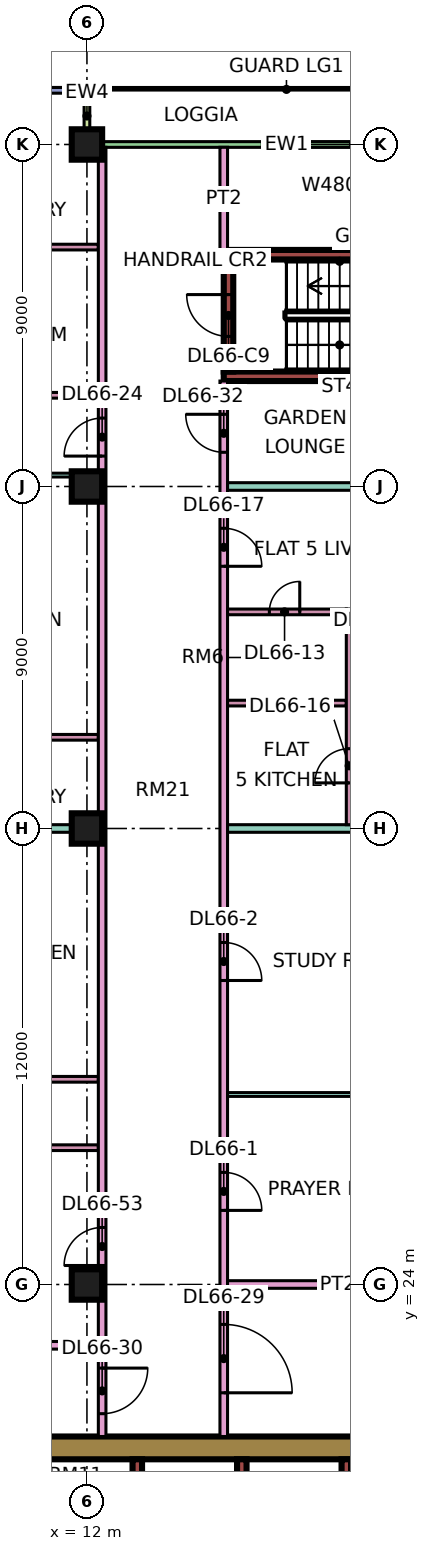
"""IFC4 building model, lengths in metres.
Left out: names, types, materials, properties, quantities, classifications, styles, units other than length and angle.
Written with IfcOpenShell. Run it as: python <this file> out.ifc"""

import sys

from ifc_helpers import new_model, si_unit, direction, frame, frame_2d, origin, origin_2d, place, context, subcontext, project, spatial, rectangle, extrude, element, fill, save


model = new_model("IFC4")
c1 = context("Model", 3, precision=1e-05, world=origin(), true_north=direction((0.0, 1.0)))
c2 = subcontext(c1, "Body", "Model", "MODEL_VIEW")
j1 = project(units=[si_unit("LENGTHUNIT", "METRE"), si_unit("PLANEANGLEUNIT", "RADIAN")], contexts=[c1])
p1 = place(None, origin())
s1 = spatial("IfcSite", under=j1, at=p1, CompositionType="ELEMENT")
p2 = place(p1, origin())
s2 = spatial("IfcBuilding", under=s1, at=p2, CompositionType="ELEMENT")
p3 = place(p2, frame((0.0, 0.0, 284.65)))
s3 = spatial("IfcBuildingStorey", under=s2, at=p3, CompositionType="ELEMENT", Elevation=284.65)
for number, where, z_axis, x_axis in (
    (1, (12.0, 24.0, 0.0), (0.0, 0.0, 1.0), (1.0, 0.0, 0.0)),
    (2, (12.0, 36.0, 0.0), (0.0, 0.0, 1.0), (1.0, 0.0, 0.0)),
    (3, (12.0, 45.0, 0.0), (0.0, 0.0, 1.0), (1.0, 0.0, 0.0)),
    (4, (12.0, 54.0, 0.0), (0.0, 0.0, 1.0), (1.0, 0.0, 0.0)),
):
    element("IfcColumn", number, at=place(p3, frame(where, z_axis=z_axis, x_axis=x_axis)), inside=s3, PredefinedType="COLUMN", context=c2, shape_type="SweptSolid", body=[
        extrude(rectangle(XDim=0.8, YDim=0.8, at=origin_2d()), origin(), (0.0, 0.0, 1.0), 3.75),
    ])
p4 = place(p3, frame((9.0, 19.7, 0.0), z_axis=(0.0, 0.0, 1.0), x_axis=(1.0, 0.0, 0.0)))
e5 = element("IfcWall", 5, at=p4, inside=s3, PredefinedType="SHEAR", context=c2, shape_type="SweptSolid", body=[
    extrude(rectangle(XDim=25.0, YDim=0.6, at=frame_2d((12.5, 0.0))), origin(), (0.0, 0.0, 1.0), 3.75),
])
p5 = place(p4, frame((19.1, 0.0, 0.0)))
e6 = element("IfcOpeningElement", 6, at=p5, cuts=e5, PredefinedType="OPENING", context=c2, shape_type="SweptSolid", body=[
    extrude(rectangle(XDim=1.8, YDim=2.4, at=frame_2d((0.9, 1.2))), frame((0.0, 0.31, 0.0), z_axis=(0.0, -1.0, 0.0), x_axis=(1.0, 0.0, 0.0)), (0.0, 0.0, 1.0), 0.62),
])
p6 = place(p3, frame((13.325, 7.6, 0.0), z_axis=(0.0, 0.0, 1.0), x_axis=(0.0, 1.0, 0.0)))
e7 = element("IfcWall", 7, at=p6, inside=s3, PredefinedType="SHEAR", context=c2, shape_type="SweptSolid", body=[
    extrude(rectangle(XDim=11.8, YDim=0.25, at=frame_2d((5.9, 0.0))), origin(), (0.0, 0.0, 1.0), 3.75),
])
for number, where, z_axis, x_axis in (
    (8, (16.075, 15.8, 0.0), (0.0, 0.0, 1.0), (0.0, 1.0, 0.0)),
    (9, (18.825, 15.8, 0.0), (0.0, 0.0, 1.0), (0.0, 1.0, 0.0)),
):
    element("IfcWall", number, at=place(p3, frame(where, z_axis=z_axis, x_axis=x_axis)), inside=s3, PredefinedType="SHEAR", context=c2, shape_type="SweptSolid", body=[
        extrude(rectangle(XDim=3.6, YDim=0.25, at=frame_2d((1.8, 0.0))), origin(), (0.0, 0.0, 1.0), 3.75),
    ])
for number, where, z_axis, x_axis in (
    (10, (15.6, 47.9, 0.0), (0.0, 0.0, 1.0), (1.0, 0.0, 0.0)),
    (11, (15.6, 51.1, 0.0), (0.0, 0.0, 1.0), (1.0, 0.0, 0.0)),
):
    element("IfcWall", number, at=place(p3, frame(where, z_axis=z_axis, x_axis=x_axis)), inside=s3, PredefinedType="SHEAR", context=c2, shape_type="SweptSolid", body=[
        extrude(rectangle(XDim=7.0, YDim=0.25, at=frame_2d((3.5, 0.0))), origin(), (0.0, 0.0, 1.0), 3.75),
    ])
p7 = place(p3, frame((15.725, 48.025, 0.0), z_axis=(0.0, 0.0, 1.0), x_axis=(0.0, 1.0, 0.0)))
e12 = element("IfcWall", 12, at=p7, inside=s3, PredefinedType="SHEAR", context=c2, shape_type="SweptSolid", body=[
    extrude(rectangle(XDim=2.95, YDim=0.25, at=frame_2d((1.475, 0.0))), origin(), (0.0, 0.0, 1.0), 3.75),
])
p8 = place(p7, frame((0.925, 0.0, 0.0)))
e13 = element("IfcOpeningElement", 13, at=p8, cuts=e12, PredefinedType="OPENING", context=c2, shape_type="SweptSolid", body=[
    extrude(rectangle(XDim=1.1, YDim=2.2, at=frame_2d((0.55, 1.1))), frame((0.0, 0.135, 0.0), z_axis=(0.0, -1.0, 0.0), x_axis=(1.0, 0.0, 0.0)), (0.0, 0.0, 1.0), 0.27),
])
p9 = place(p3, frame((22.425, 54.0, 0.0), z_axis=(0.0, 0.0, 1.0), x_axis=(-1.0, 0.0, 0.0)))
e14 = element("IfcWall", 14, at=p9, inside=s3, PredefinedType="SOLIDWALL", context=c2, shape_type="SweptSolid", body=[
    extrude(rectangle(XDim=10.35, YDim=0.15, at=frame_2d((5.175, 0.0))), origin(), (0.0, 0.0, 1.0), 3.35),
])
p10 = place(p9, frame((1.012, 0.0, 0.45)))
e15 = element("IfcOpeningElement", 15, at=p10, cuts=e14, PredefinedType="OPENING", context=c2, shape_type="SweptSolid", body=[
    extrude(rectangle(XDim=4.8, YDim=2.4, at=frame_2d((2.4, 1.2))), frame((0.0, 0.085, 0.0), z_axis=(0.0, -1.0, 0.0), x_axis=(1.0, 0.0, 0.0)), (0.0, 0.0, 1.0), 0.17),
])
p11 = place(p3, frame((12.0, 55.5, 0.0), z_axis=(0.0, 0.0, 1.0), x_axis=(0.0, -1.0, 0.0)))
e16 = element("IfcWall", 16, at=p11, inside=s3, PredefinedType="SOLIDWALL", context=c2, shape_type="SweptSolid", body=[
    extrude(rectangle(XDim=1.5, YDim=0.15, at=frame_2d((0.75, 0.0))), origin(), (0.0, 0.0, 1.0), 3.35),
])
p12 = place(p3, frame((11.925, 55.425, 0.0), z_axis=(0.0, 0.0, 1.0), x_axis=(-1.0, 0.0, 0.0)))
e17 = element("IfcWall", 17, at=p12, inside=s3, PredefinedType="SOLIDWALL", context=c2, shape_type="SweptSolid", body=[
    extrude(rectangle(XDim=10.425, YDim=0.15, at=frame_2d((5.212, 0.0))), origin(), (0.0, 0.0, 1.0), 3.35),
])
p13 = place(p12, frame((1.562, 0.0, 1.7)))
e18 = element("IfcOpeningElement", 18, at=p13, cuts=e17, PredefinedType="OPENING", context=c2, shape_type="SweptSolid", body=[
    extrude(rectangle(XDim=1.2, YDim=0.9, at=frame_2d((0.6, 0.45))), frame((0.0, 0.085, 0.0), z_axis=(0.0, -1.0, 0.0), x_axis=(1.0, 0.0, 0.0)), (0.0, 0.0, 1.0), 0.17),
])
p14 = place(p12, frame((6.475, 0.0, 0.45)))
e19 = element("IfcOpeningElement", 19, at=p14, cuts=e17, PredefinedType="OPENING", context=c2, shape_type="SweptSolid", body=[
    extrude(rectangle(XDim=3.0, YDim=2.4, at=frame_2d((1.5, 1.2))), frame((0.0, 0.085, 0.0), z_axis=(0.0, -1.0, 0.0), x_axis=(1.0, 0.0, 0.0)), (0.0, 0.0, 1.0), 0.17),
])
p15 = place(p3, frame((0.0, 36.0, 0.0), z_axis=(0.0, 0.0, 1.0), x_axis=(1.0, 0.0, 0.0)))
e20 = element("IfcWall", 20, at=p15, inside=s3, PredefinedType="PARTITIONING", context=c2, shape_type="SweptSolid", body=[
    extrude(rectangle(XDim=12.3, YDim=0.2, at=frame_2d((6.15, 0.0))), origin(), (0.0, 0.0, 1.0), 3.35),
])
p16 = place(p3, frame((0.074, 22.4, 0.0), z_axis=(0.0, 0.0, 1.0), x_axis=(1.0, 0.0, 0.0)))
e21 = element("IfcWall", 21, at=p16, inside=s3, PredefinedType="PARTITIONING", context=c2, shape_type="SweptSolid", body=[
    extrude(rectangle(XDim=12.226, YDim=0.2, at=frame_2d((6.113, 0.0))), origin(), (0.0, 0.0, 1.0), 3.35),
])
for number, where, z_axis, x_axis in (
    (22, (7.075, 27.6, 0.0), (0.0, 0.0, 1.0), (1.0, 0.0, 0.0)),
    (23, (7.075, 29.4, 0.0), (0.0, 0.0, 1.0), (1.0, 0.0, 0.0)),
):
    element("IfcWall", number, at=place(p3, frame(where, z_axis=z_axis, x_axis=x_axis)), inside=s3, PredefinedType="PARTITIONING", context=c2, shape_type="SweptSolid", body=[
        extrude(rectangle(XDim=5.225, YDim=0.15, at=frame_2d((2.613, 0.0))), origin(), (0.0, 0.0, 1.0), 3.35),
    ])
p17 = place(p3, frame((7.675, 38.4, 0.0), z_axis=(0.0, 0.0, 1.0), x_axis=(1.0, 0.0, 0.0)))
e24 = element("IfcWall", 24, at=p17, inside=s3, PredefinedType="PARTITIONING", context=c2, shape_type="SweptSolid", body=[
    extrude(rectangle(XDim=4.625, YDim=0.15, at=frame_2d((2.312, 0.0))), origin(), (0.0, 0.0, 1.0), 3.35),
])
p18 = place(p3, frame((7.675, 45.3, 0.0), z_axis=(0.0, 0.0, 1.0), x_axis=(1.0, 0.0, 0.0)))
e25 = element("IfcWall", 25, at=p18, inside=s3, PredefinedType="PARTITIONING", context=c2, shape_type="SweptSolid", body=[
    extrude(rectangle(XDim=4.625, YDim=0.1, at=frame_2d((2.312, 0.0))), origin(), (0.0, 0.0, 1.0), 3.35),
])
for number, where, z_axis, x_axis in (
    (26, (7.675, 47.4, 0.0), (0.0, 0.0, 1.0), (1.0, 0.0, 0.0)),
    (27, (7.675, 51.3, 0.0), (0.0, 0.0, 1.0), (1.0, 0.0, 0.0)),
):
    element("IfcWall", number, at=place(p3, frame(where, z_axis=z_axis, x_axis=x_axis)), inside=s3, PredefinedType="PARTITIONING", context=c2, shape_type="SweptSolid", body=[
        extrude(rectangle(XDim=4.625, YDim=0.15, at=frame_2d((2.312, 0.0))), origin(), (0.0, 0.0, 1.0), 3.35),
    ])
p19 = place(p3, frame((12.4, 20.0, 0.0), z_axis=(0.0, 0.0, 1.0), x_axis=(0.0, 1.0, 0.0)))
e28 = element("IfcWall", 28, at=p19, inside=s3, PredefinedType="PARTITIONING", context=c2, shape_type="SweptSolid", body=[
    extrude(rectangle(XDim=33.926, YDim=0.2, at=frame_2d((16.963, 0.0))), origin(), (0.0, 0.0, 1.0), 3.35),
])
p20 = place(p19, frame((25.8, 0.0, 0.0)))
e29 = element("IfcOpeningElement", 29, at=p20, cuts=e28, PredefinedType="OPENING", context=c2, shape_type="SweptSolid", body=[
    extrude(rectangle(XDim=1.0, YDim=2.1, at=frame_2d((0.5, 1.05))), frame((0.0, 0.11, 0.0), z_axis=(0.0, -1.0, 0.0), x_axis=(1.0, 0.0, 0.0)), (0.0, 0.0, 1.0), 0.22),
])
p21 = place(p19, frame((0.6, 0.0, 0.0)))
e30 = element("IfcOpeningElement", 30, at=p21, cuts=e28, PredefinedType="OPENING", context=c2, shape_type="SweptSolid", body=[
    extrude(rectangle(XDim=1.2, YDim=2.1, at=frame_2d((0.6, 1.05))), frame((0.0, 0.11, 0.0), z_axis=(0.0, -1.0, 0.0), x_axis=(1.0, 0.0, 0.0)), (0.0, 0.0, 1.0), 0.22),
])
p22 = place(p19, frame((4.5, 0.0, 0.0)))
e31 = element("IfcOpeningElement", 31, at=p22, cuts=e28, PredefinedType="OPENING", context=c2, shape_type="SweptSolid", body=[
    extrude(rectangle(XDim=1.0, YDim=2.1, at=frame_2d((0.5, 1.05))), frame((0.0, 0.11, 0.0), z_axis=(0.0, -1.0, 0.0), x_axis=(1.0, 0.0, 0.0)), (0.0, 0.0, 1.0), 0.22),
])
p23 = place(p3, frame((15.6, 20.0, 0.0), z_axis=(0.0, 0.0, 1.0), x_axis=(0.0, 1.0, 0.0)))
e32 = element("IfcWall", 32, at=p23, inside=s3, PredefinedType="PARTITIONING", context=c2, shape_type="SweptSolid", body=[
    extrude(rectangle(XDim=27.775, YDim=0.2, at=frame_2d((13.887, 0.0))), origin(), (0.0, 0.0, 1.0), 3.35),
])
p24 = place(p23, frame((5.95, 0.0, 0.0)))
e33 = element("IfcOpeningElement", 33, at=p24, cuts=e32, PredefinedType="OPENING", context=c2, shape_type="SweptSolid", body=[
    extrude(rectangle(XDim=1.0, YDim=2.1, at=frame_2d((0.5, 1.05))), frame((0.0, 0.11, 0.0), z_axis=(0.0, -1.0, 0.0), x_axis=(1.0, 0.0, 0.0)), (0.0, 0.0, 1.0), 0.22),
])
p25 = place(p23, frame((12.0, 0.0, 0.0)))
e34 = element("IfcOpeningElement", 34, at=p25, cuts=e32, PredefinedType="OPENING", context=c2, shape_type="SweptSolid", body=[
    extrude(rectangle(XDim=1.0, YDim=2.1, at=frame_2d((0.5, 1.05))), frame((0.0, 0.11, 0.0), z_axis=(0.0, -1.0, 0.0), x_axis=(1.0, 0.0, 0.0)), (0.0, 0.0, 1.0), 0.22),
])
p26 = place(p23, frame((22.9, 0.0, 0.0)))
e35 = element("IfcOpeningElement", 35, at=p26, cuts=e32, PredefinedType="OPENING", context=c2, shape_type="SweptSolid", body=[
    extrude(rectangle(XDim=1.0, YDim=2.1, at=frame_2d((0.5, 1.05))), frame((0.0, 0.11, 0.0), z_axis=(0.0, -1.0, 0.0), x_axis=(1.0, 0.0, 0.0)), (0.0, 0.0, 1.0), 0.22),
])
p27 = place(p23, frame((1.15, 0.0, 0.0)))
e36 = element("IfcOpeningElement", 36, at=p27, cuts=e32, PredefinedType="OPENING", context=c2, shape_type="SweptSolid", body=[
    extrude(rectangle(XDim=1.8, YDim=2.1, at=frame_2d((0.9, 1.05))), frame((0.0, 0.11, 0.0), z_axis=(0.0, -1.0, 0.0), x_axis=(1.0, 0.0, 0.0)), (0.0, 0.0, 1.0), 0.22),
])
p28 = place(p23, frame((25.9, 0.0, 0.0)))
e37 = element("IfcOpeningElement", 37, at=p28, cuts=e32, PredefinedType="OPENING", context=c2, shape_type="SweptSolid", body=[
    extrude(rectangle(XDim=1.0, YDim=2.1, at=frame_2d((0.5, 1.05))), frame((0.0, 0.11, 0.0), z_axis=(0.0, -1.0, 0.0), x_axis=(1.0, 0.0, 0.0)), (0.0, 0.0, 1.0), 0.22),
])
p29 = place(p3, frame((15.6, 51.225, 0.0), z_axis=(0.0, 0.0, 1.0), x_axis=(0.0, 1.0, 0.0)))
e38 = element("IfcWall", 38, at=p29, inside=s3, PredefinedType="PARTITIONING", context=c2, shape_type="SweptSolid", body=[
    extrude(rectangle(XDim=2.701, YDim=0.2, at=frame_2d((1.351, 0.0))), origin(), (0.0, 0.0, 1.0), 3.35),
])
p30 = place(p3, frame((15.7, 24.0, 0.0), z_axis=(0.0, 0.0, 1.0), x_axis=(1.0, 0.0, 0.0)))
e39 = element("IfcWall", 39, at=p30, inside=s3, PredefinedType="PARTITIONING", context=c2, shape_type="SweptSolid", body=[
    extrude(rectangle(XDim=5.8, YDim=0.2, at=frame_2d((2.9, 0.0))), origin(), (0.0, 0.0, 1.0), 3.35),
])
p31 = place(p3, frame((15.7, 29.0, 0.0), z_axis=(0.0, 0.0, 1.0), x_axis=(1.0, 0.0, 0.0)))
e40 = element("IfcWall", 40, at=p31, inside=s3, PredefinedType="PARTITIONING", context=c2, shape_type="SweptSolid", body=[
    extrude(rectangle(XDim=5.8, YDim=0.1, at=frame_2d((2.9, 0.0))), origin(), (0.0, 0.0, 1.0), 3.35),
])
p32 = place(p3, frame((15.7, 36.0, 0.0), z_axis=(0.0, 0.0, 1.0), x_axis=(1.0, 0.0, 0.0)))
e41 = element("IfcWall", 41, at=p32, inside=s3, PredefinedType="PARTITIONING", context=c2, shape_type="SweptSolid", body=[
    extrude(rectangle(XDim=8.3, YDim=0.2, at=frame_2d((4.15, 0.0))), origin(), (0.0, 0.0, 1.0), 3.35),
])
p33 = place(p3, frame((15.7, 39.3, 0.0), z_axis=(0.0, 0.0, 1.0), x_axis=(1.0, 0.0, 0.0)))
e42 = element("IfcWall", 42, at=p33, inside=s3, PredefinedType="PARTITIONING", context=c2, shape_type="SweptSolid", body=[
    extrude(rectangle(XDim=3.125, YDim=0.15, at=frame_2d((1.562, 0.0))), origin(), (0.0, 0.0, 1.0), 3.35),
])
p34 = place(p3, frame((15.7, 41.7, 0.0), z_axis=(0.0, 0.0, 1.0), x_axis=(1.0, 0.0, 0.0)))
e43 = element("IfcWall", 43, at=p34, inside=s3, PredefinedType="PARTITIONING", context=c2, shape_type="SweptSolid", body=[
    extrude(rectangle(XDim=3.125, YDim=0.15, at=frame_2d((1.562, 0.0))), origin(), (0.0, 0.0, 1.0), 3.35),
])
p35 = place(p34, frame((1.1, 0.0, 0.0)))
e44 = element("IfcOpeningElement", 44, at=p35, cuts=e43, PredefinedType="OPENING", context=c2, shape_type="SweptSolid", body=[
    extrude(rectangle(XDim=0.8, YDim=2.1, at=frame_2d((0.4, 1.05))), frame((0.0, 0.085, 0.0), z_axis=(0.0, -1.0, 0.0), x_axis=(1.0, 0.0, 0.0)), (0.0, 0.0, 1.0), 0.17),
])
p36 = place(p3, frame((15.7, 45.0, 0.0), z_axis=(0.0, 0.0, 1.0), x_axis=(1.0, 0.0, 0.0)))
e45 = element("IfcWall", 45, at=p36, inside=s3, PredefinedType="PARTITIONING", context=c2, shape_type="SweptSolid", body=[
    extrude(rectangle(XDim=8.226, YDim=0.2, at=frame_2d((4.113, 0.0))), origin(), (0.0, 0.0, 1.0), 3.35),
])
p37 = place(p3, frame((18.9, 36.1, 0.0), z_axis=(0.0, 0.0, 1.0), x_axis=(0.0, 1.0, 0.0)))
e46 = element("IfcWall", 46, at=p37, inside=s3, PredefinedType="PARTITIONING", context=c2, shape_type="SweptSolid", body=[
    extrude(rectangle(XDim=5.675, YDim=0.15, at=frame_2d((2.837, 0.0))), origin(), (0.0, 0.0, 1.0), 3.35),
])
p38 = place(p37, frame((1.1, 0.0, 0.0)))
e47 = element("IfcOpeningElement", 47, at=p38, cuts=e46, PredefinedType="OPENING", context=c2, shape_type="SweptSolid", body=[
    extrude(rectangle(XDim=0.9, YDim=2.1, at=frame_2d((0.45, 1.05))), frame((0.0, 0.085, 0.0), z_axis=(0.0, -1.0, 0.0), x_axis=(1.0, 0.0, 0.0)), (0.0, 0.0, 1.0), 0.17),
])
p39 = place(p10, origin())
e48 = element("IfcWindow", 48, at=p39, inside=s3, PartitioningType="SINGLE_PANEL", PredefinedType="WINDOW", context=c2, shape_type="SweptSolid", body=[
    extrude(rectangle(XDim=4.8, YDim=2.4, at=frame_2d((2.4, 1.2))), frame((0.0, 0.03, 0.0), z_axis=(0.0, -1.0, 0.0), x_axis=(1.0, 0.0, 0.0)), (0.0, 0.0, 1.0), 0.06),
])
fill(e15, e48)
p40 = place(p8, frame((1.1, 0.0, 0.0), z_axis=(0.0, 0.0, 1.0), x_axis=(-1.0, 0.0, 0.0)))
e49 = element("IfcDoor", 49, at=p40, inside=s3, OperationType="SINGLE_SWING_RIGHT", PredefinedType="DOOR", context=c2, shape_type="SweptSolid", body=[
    extrude(rectangle(XDim=1.1, YDim=2.2, at=frame_2d((0.55, 1.1))), frame((0.0, 0.025, 0.0), z_axis=(0.0, -1.0, 0.0), x_axis=(1.0, 0.0, 0.0)), (0.0, 0.0, 1.0), 0.05),
])
fill(e13, e49)
p41 = place(p24, frame((1.0, 0.0, 0.0), z_axis=(0.0, 0.0, 1.0), x_axis=(-1.0, 0.0, 0.0)))
e50 = element("IfcDoor", 50, at=p41, inside=s3, OperationType="SINGLE_SWING_LEFT", PredefinedType="DOOR", context=c2, shape_type="SweptSolid", body=[
    extrude(rectangle(XDim=1.0, YDim=2.1, at=frame_2d((0.5, 1.05))), frame((0.0, 0.025, 0.0), z_axis=(0.0, -1.0, 0.0), x_axis=(1.0, 0.0, 0.0)), (0.0, 0.0, 1.0), 0.05),
])
fill(e33, e50)
p42 = place(p25, frame((1.0, 0.0, 0.0), z_axis=(0.0, 0.0, 1.0), x_axis=(-1.0, 0.0, 0.0)))
e51 = element("IfcDoor", 51, at=p42, inside=s3, OperationType="SINGLE_SWING_LEFT", PredefinedType="DOOR", context=c2, shape_type="SweptSolid", body=[
    extrude(rectangle(XDim=1.0, YDim=2.1, at=frame_2d((0.5, 1.05))), frame((0.0, 0.025, 0.0), z_axis=(0.0, -1.0, 0.0), x_axis=(1.0, 0.0, 0.0)), (0.0, 0.0, 1.0), 0.05),
])
fill(e34, e51)
p43 = place(p35, frame((0.8, 0.0, 0.0), z_axis=(0.0, 0.0, 1.0), x_axis=(-1.0, 0.0, 0.0)))
e52 = element("IfcDoor", 52, at=p43, inside=s3, OperationType="SINGLE_SWING_RIGHT", PredefinedType="DOOR", context=c2, shape_type="SweptSolid", body=[
    extrude(rectangle(XDim=0.8, YDim=2.1, at=frame_2d((0.4, 1.05))), frame((0.0, 0.025, 0.0), z_axis=(0.0, -1.0, 0.0), x_axis=(1.0, 0.0, 0.0)), (0.0, 0.0, 1.0), 0.05),
])
fill(e44, e52)
p44 = place(p38, origin())
e53 = element("IfcDoor", 53, at=p44, inside=s3, OperationType="SINGLE_SWING_LEFT", PredefinedType="DOOR", context=c2, shape_type="SweptSolid", body=[
    extrude(rectangle(XDim=0.9, YDim=2.1, at=frame_2d((0.45, 1.05))), frame((0.0, 0.025, 0.0), z_axis=(0.0, -1.0, 0.0), x_axis=(1.0, 0.0, 0.0)), (0.0, 0.0, 1.0), 0.05),
])
fill(e47, e53)
p45 = place(p26, frame((1.0, 0.0, 0.0), z_axis=(0.0, 0.0, 1.0), x_axis=(-1.0, 0.0, 0.0)))
e54 = element("IfcDoor", 54, at=p45, inside=s3, OperationType="SINGLE_SWING_LEFT", PredefinedType="DOOR", context=c2, shape_type="SweptSolid", body=[
    extrude(rectangle(XDim=1.0, YDim=2.1, at=frame_2d((0.5, 1.05))), frame((0.0, 0.025, 0.0), z_axis=(0.0, -1.0, 0.0), x_axis=(1.0, 0.0, 0.0)), (0.0, 0.0, 1.0), 0.05),
])
fill(e35, e54)
p46 = place(p20, origin())
e55 = element("IfcDoor", 55, at=p46, inside=s3, OperationType="SINGLE_SWING_LEFT", PredefinedType="DOOR", context=c2, shape_type="SweptSolid", body=[
    extrude(rectangle(XDim=1.0, YDim=2.1, at=frame_2d((0.5, 1.05))), frame((0.0, 0.025, 0.0), z_axis=(0.0, -1.0, 0.0), x_axis=(1.0, 0.0, 0.0)), (0.0, 0.0, 1.0), 0.05),
])
fill(e29, e55)
p47 = place(p27, frame((1.8, 0.0, 0.0), z_axis=(0.0, 0.0, 1.0), x_axis=(-1.0, 0.0, 0.0)))
e56 = element("IfcDoor", 56, at=p47, inside=s3, OperationType="DOUBLE_DOOR_SINGLE_SWING", PredefinedType="DOOR", context=c2, shape_type="SweptSolid", body=[
    extrude(rectangle(XDim=1.8, YDim=2.1, at=frame_2d((0.9, 1.05))), frame((0.0, 0.025, 0.0), z_axis=(0.0, -1.0, 0.0), x_axis=(1.0, 0.0, 0.0)), (0.0, 0.0, 1.0), 0.05),
])
fill(e36, e56)
p48 = place(p21, origin())
e57 = element("IfcDoor", 57, at=p48, inside=s3, OperationType="SINGLE_SWING_RIGHT", PredefinedType="DOOR", context=c2, shape_type="SweptSolid", body=[
    extrude(rectangle(XDim=1.2, YDim=2.1, at=frame_2d((0.6, 1.05))), frame((0.0, 0.025, 0.0), z_axis=(0.0, -1.0, 0.0), x_axis=(1.0, 0.0, 0.0)), (0.0, 0.0, 1.0), 0.05),
])
fill(e30, e57)
p49 = place(p28, frame((1.0, 0.0, 0.0), z_axis=(0.0, 0.0, 1.0), x_axis=(-1.0, 0.0, 0.0)))
e58 = element("IfcDoor", 58, at=p49, inside=s3, OperationType="SINGLE_SWING_RIGHT", PredefinedType="DOOR", context=c2, shape_type="SweptSolid", body=[
    extrude(rectangle(XDim=1.0, YDim=2.1, at=frame_2d((0.5, 1.05))), frame((0.0, 0.025, 0.0), z_axis=(0.0, -1.0, 0.0), x_axis=(1.0, 0.0, 0.0)), (0.0, 0.0, 1.0), 0.05),
])
fill(e37, e58)
p50 = place(p22, origin())
e59 = element("IfcDoor", 59, at=p50, inside=s3, OperationType="SINGLE_SWING_LEFT", PredefinedType="DOOR", context=c2, shape_type="SweptSolid", body=[
    extrude(rectangle(XDim=1.0, YDim=2.1, at=frame_2d((0.5, 1.05))), frame((0.0, 0.025, 0.0), z_axis=(0.0, -1.0, 0.0), x_axis=(1.0, 0.0, 0.0)), (0.0, 0.0, 1.0), 0.05),
])
fill(e31, e59)
save(model, sys.argv[1])
